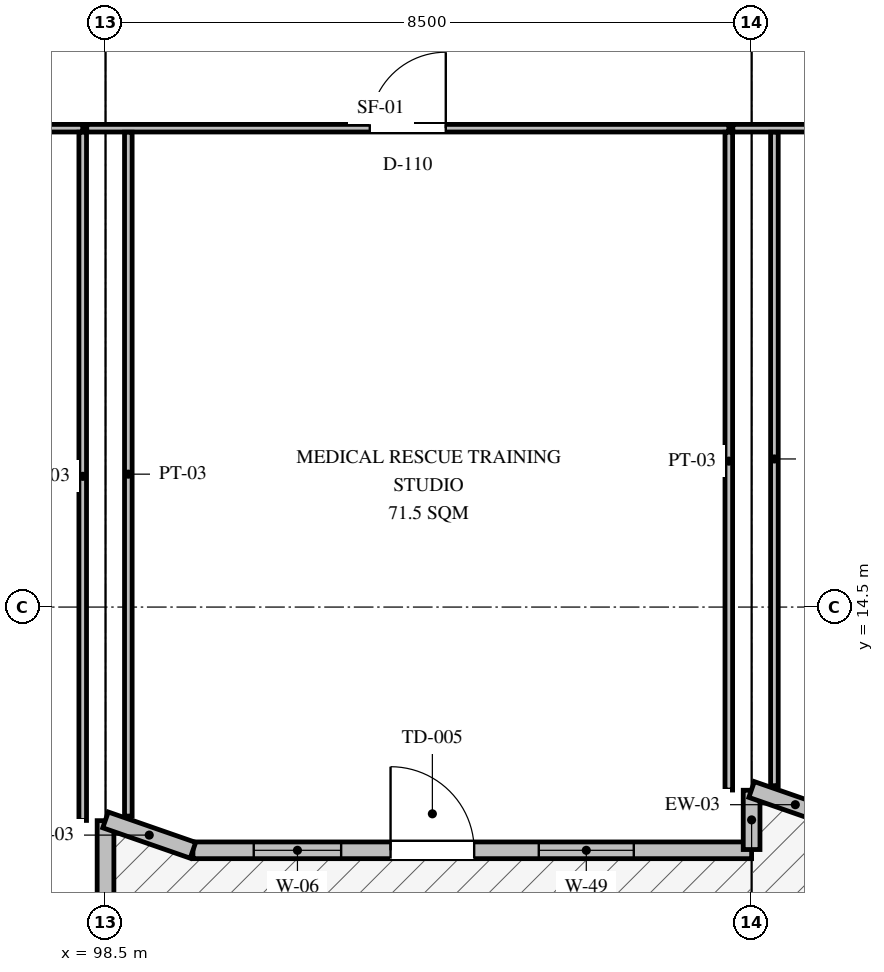
"""IFC4 building model, lengths in metres.
Left out: names, types, materials, properties, quantities, classifications, styles, units other than length and angle.
Written with IfcOpenShell. Run it as: python <this file> out.ifc"""

import sys

from ifc_helpers import new_model, si_unit, direction, frame, frame_2d, origin, place, context, subcontext, project, spatial, polyline, rectangle, outline, extrude, element, fill, save


model = new_model("IFC4")
c1 = context("Model", 3, precision=1e-05, world=origin(), true_north=direction((0.0, 1.0)))
c2 = subcontext(c1, "Body", "Model", "MODEL_VIEW")
j1 = project(units=[si_unit("LENGTHUNIT", "METRE"), si_unit("PLANEANGLEUNIT", "RADIAN")], contexts=[c1])
p1 = place(None, origin())
s1 = spatial("IfcSite", under=j1, at=p1, CompositionType="ELEMENT")
p2 = place(p1, origin())
s2 = spatial("IfcBuilding", under=s1, at=p2, CompositionType="ELEMENT")
p3 = place(p2, frame((0.0, 0.0, 5.85)))
s3 = spatial("IfcBuildingStorey", under=s2, at=p3, CompositionType="ELEMENT", Elevation=5.85)
p4 = place(p3, frame((98.5, 6.51, 0.0), z_axis=(0.0, 0.0, 1.0), x_axis=(0.0, 1.0, 0.0)))
e1 = element("IfcWall", 1, at=p4, inside=s3, PredefinedType="SOLIDWALL", context=c2, shape_type="SweptSolid", body=[
    extrude(rectangle(XDim=5.18, YDim=0.22, at=frame_2d((2.59, 0.0))), origin(), (0.0, 0.0, 1.0), 3.59),
])
p5 = place(p3, frame((99.65, 11.3, 0.0), z_axis=(0.0, 0.0, 1.0), x_axis=(1.0, 0.0, 0.0)))
e2 = element("IfcWall", 2, at=p5, inside=s3, PredefinedType="SOLIDWALL", context=c2, shape_type="SweptSolid", body=[
    extrude(rectangle(XDim=7.35, YDim=0.22, at=frame_2d((3.675, 0.0))), origin(), (0.0, 0.0, 1.0), 4.0),
])
p6 = place(p5, frame((2.6, 0.0, 0.0)))
e3 = element("IfcOpeningElement", 3, at=p6, cuts=e2, PredefinedType="OPENING", context=c2, shape_type="SweptSolid", body=[
    extrude(rectangle(XDim=1.1, YDim=2.2, at=frame_2d((0.55, 1.1))), frame((0.0, 0.12, 0.0), z_axis=(0.0, -1.0, 0.0), x_axis=(1.0, 0.0, 0.0)), (0.0, 0.0, 1.0), 0.24),
])
p7 = place(p5, frame((0.8, 0.0, 1.1)))
e4 = element("IfcOpeningElement", 4, at=p7, cuts=e2, PredefinedType="OPENING", context=c2, shape_type="SweptSolid", body=[
    extrude(rectangle(XDim=1.15, YDim=1.15, at=frame_2d((0.575, 0.575))), frame((0.0, 0.12, 0.0), z_axis=(0.0, -1.0, 0.0), x_axis=(1.0, 0.0, 0.0)), (0.0, 0.0, 1.0), 0.24),
])
p8 = place(p5, frame((4.55, 0.0, 1.35)))
e5 = element("IfcOpeningElement", 5, at=p8, cuts=e2, PredefinedType="OPENING", context=c2, shape_type="SweptSolid", body=[
    extrude(rectangle(XDim=1.25, YDim=1.65, at=frame_2d((0.625, 0.825))), frame((0.0, 0.12, 0.0), z_axis=(0.0, -1.0, 0.0), x_axis=(1.0, 0.0, 0.0)), (0.0, 0.0, 1.0), 0.24),
])
p9 = place(p3, frame((98.5, 11.7, 0.0), z_axis=(0.0, 0.0, 1.0), x_axis=(0.944513027611, -0.328473957373, 0.0)))
e6 = element("IfcWall", 6, at=p9, inside=s3, PredefinedType="SOLIDWALL", context=c2, shape_type="SweptSolid", body=[
    extrude(outline(polyline([(0.0, 0.0), (1.218, 0.0), (1.218, 3.95), (0.0, 3.95), (0.0, 0.0)])), frame((0.0, 0.11, 0.0), z_axis=(0.0, -1.0, 0.0), x_axis=(1.0, 0.0, 0.0)), (0.0, 0.0, 1.0), 0.22),
])
p10 = place(p3, frame((107.0, 11.31, 0.0), z_axis=(0.0, 0.0, 1.0), x_axis=(0.0, 1.0, 0.0)))
e7 = element("IfcWall", 7, at=p10, inside=s3, PredefinedType="SOLIDWALL", context=c2, shape_type="SweptSolid", body=[
    extrude(rectangle(XDim=0.78, YDim=0.22, at=frame_2d((0.39, 0.0))), origin(), (0.0, 0.0, 1.0), 3.59),
])
p11 = place(p3, frame((107.0, 12.1, 0.0), z_axis=(0.0, 0.0, 1.0), x_axis=(0.944450799651, -0.328652836651, 0.0)))
e8 = element("IfcWall", 8, at=p11, inside=s3, PredefinedType="SOLIDWALL", context=c2, shape_type="SweptSolid", body=[
    extrude(outline(polyline([(0.0, 0.0), (1.218, 0.0), (1.218, 3.95), (0.0, 3.95), (0.0, 0.0)])), frame((0.0, 0.11, 0.0), z_axis=(0.0, -1.0, 0.0), x_axis=(1.0, 0.0, 0.0)), (0.0, 0.0, 1.0), 0.22),
])
p12 = place(p3, frame((89.753, 20.8, 0.0), z_axis=(0.0, 0.0, 1.0), x_axis=(1.0, 0.0, 0.0)))
e9 = element("IfcWall", 9, at=p12, inside=s3, PredefinedType="PARTITIONING", context=c2, shape_type="SweptSolid", body=[
    extrude(rectangle(XDim=8.447, YDim=0.1, at=frame_2d((4.224, 0.0))), origin(), (0.0, 0.0, 1.0), 3.544),
])
p13 = place(p12, frame((3.723, 0.0, 0.0)))
e10 = element("IfcOpeningElement", 10, at=p13, cuts=e9, PredefinedType="OPENING", context=c2, shape_type="SweptSolid", body=[
    extrude(rectangle(XDim=1.0, YDim=2.1, at=frame_2d((0.5, 1.05))), frame((0.0, 0.06, 0.0), z_axis=(0.0, -1.0, 0.0), x_axis=(1.0, 0.0, 0.0)), (0.0, 0.0, 1.0), 0.12),
])
p14 = place(p3, frame((98.2, 11.693, 0.0), z_axis=(0.0, 0.0, 1.0), x_axis=(0.0, 1.0, 0.0)))
e11 = element("IfcWall", 11, at=p14, inside=s3, PredefinedType="PARTITIONING", context=c2, shape_type="SweptSolid", body=[
    extrude(rectangle(XDim=9.054, YDim=0.1, at=frame_2d((4.527, 0.0))), origin(), (0.0, 0.0, 1.0), 3.594),
])
p15 = place(p3, frame((98.253, 20.8, 0.0), z_axis=(0.0, 0.0, 1.0), x_axis=(1.0, 0.0, 0.0)))
e12 = element("IfcWall", 12, at=p15, inside=s3, PredefinedType="PARTITIONING", context=c2, shape_type="SweptSolid", body=[
    extrude(rectangle(XDim=8.447, YDim=0.1, at=frame_2d((4.224, 0.0))), origin(), (0.0, 0.0, 1.0), 3.544),
])
p16 = place(p15, frame((3.723, 0.0, 0.0)))
e13 = element("IfcOpeningElement", 13, at=p16, cuts=e12, PredefinedType="OPENING", context=c2, shape_type="SweptSolid", body=[
    extrude(rectangle(XDim=1.0, YDim=2.1, at=frame_2d((0.5, 1.05))), frame((0.0, 0.06, 0.0), z_axis=(0.0, -1.0, 0.0), x_axis=(1.0, 0.0, 0.0)), (0.0, 0.0, 1.0), 0.12),
])
p17 = place(p3, frame((98.8, 11.75, 0.0), z_axis=(0.0, 0.0, 1.0), x_axis=(0.0, 1.0, 0.0)))
e14 = element("IfcWall", 14, at=p17, inside=s3, PredefinedType="PARTITIONING", context=c2, shape_type="SweptSolid", body=[
    extrude(rectangle(XDim=8.997, YDim=0.1, at=frame_2d((4.499, 0.0))), origin(), (0.0, 0.0, 1.0), 3.594),
])
p18 = place(p3, frame((106.7, 12.093, 0.0), z_axis=(0.0, 0.0, 1.0), x_axis=(0.0, 1.0, 0.0)))
e15 = element("IfcWall", 15, at=p18, inside=s3, PredefinedType="PARTITIONING", context=c2, shape_type="SweptSolid", body=[
    extrude(rectangle(XDim=8.654, YDim=0.1, at=frame_2d((4.327, 0.0))), origin(), (0.0, 0.0, 1.0), 3.594),
])
p19 = place(p3, frame((106.753, 20.8, 0.0), z_axis=(0.0, 0.0, 1.0), x_axis=(1.0, 0.0, 0.0)))
e16 = element("IfcWall", 16, at=p19, inside=s3, PredefinedType="PARTITIONING", context=c2, shape_type="SweptSolid", body=[
    extrude(rectangle(XDim=8.447, YDim=0.1, at=frame_2d((4.224, 0.0))), origin(), (0.0, 0.0, 1.0), 3.544),
])
p20 = place(p19, frame((3.723, 0.0, 0.0)))
e17 = element("IfcOpeningElement", 17, at=p20, cuts=e16, PredefinedType="OPENING", context=c2, shape_type="SweptSolid", body=[
    extrude(rectangle(XDim=1.0, YDim=2.1, at=frame_2d((0.5, 1.05))), frame((0.0, 0.06, 0.0), z_axis=(0.0, -1.0, 0.0), x_axis=(1.0, 0.0, 0.0)), (0.0, 0.0, 1.0), 0.12),
])
p21 = place(p3, frame((107.3, 12.15, 0.0), z_axis=(0.0, 0.0, 1.0), x_axis=(0.0, 1.0, 0.0)))
e18 = element("IfcWall", 18, at=p21, inside=s3, PredefinedType="PARTITIONING", context=c2, shape_type="SweptSolid", body=[
    extrude(rectangle(XDim=8.597, YDim=0.1, at=frame_2d((4.299, 0.0))), origin(), (0.0, 0.0, 1.0), 3.594),
])
p22 = place(p6, frame((1.1, 0.0, 0.0), z_axis=(0.0, 0.0, 1.0), x_axis=(-1.0, 0.0, 0.0)))
e19 = element("IfcDoor", 19, at=p22, inside=s3, OperationType="SINGLE_SWING_LEFT", PredefinedType="DOOR", context=c2, shape_type="SweptSolid", body=[
    extrude(rectangle(XDim=1.1, YDim=2.2, at=frame_2d((0.55, 1.1))), frame((0.0, 0.025, 0.0), z_axis=(0.0, -1.0, 0.0), x_axis=(1.0, 0.0, 0.0)), (0.0, 0.0, 1.0), 0.05),
])
fill(e3, e19)
p23 = place(p7, origin())
e20 = element("IfcWindow", 20, at=p23, inside=s3, PartitioningType="SINGLE_PANEL", PredefinedType="WINDOW", context=c2, shape_type="SweptSolid", body=[
    extrude(rectangle(XDim=1.15, YDim=1.15, at=frame_2d((0.575, 0.575))), frame((0.0, 0.03, 0.0), z_axis=(0.0, -1.0, 0.0), x_axis=(1.0, 0.0, 0.0)), (0.0, 0.0, 1.0), 0.06),
])
fill(e4, e20)
p24 = place(p8, origin())
e21 = element("IfcWindow", 21, at=p24, inside=s3, PartitioningType="SINGLE_PANEL", PredefinedType="WINDOW", context=c2, shape_type="SweptSolid", body=[
    extrude(rectangle(XDim=1.25, YDim=1.65, at=frame_2d((0.625, 0.825))), frame((0.0, 0.03, 0.0), z_axis=(0.0, -1.0, 0.0), x_axis=(1.0, 0.0, 0.0)), (0.0, 0.0, 1.0), 0.06),
])
fill(e5, e21)
p25 = place(p16, origin())
e22 = element("IfcDoor", 22, at=p25, inside=s3, OperationType="SINGLE_SWING_RIGHT", PredefinedType="DOOR", context=c2, shape_type="SweptSolid", body=[
    extrude(rectangle(XDim=1.0, YDim=2.1, at=frame_2d((0.5, 1.05))), frame((0.0, 0.025, 0.0), z_axis=(0.0, -1.0, 0.0), x_axis=(1.0, 0.0, 0.0)), (0.0, 0.0, 1.0), 0.05),
])
fill(e13, e22)
save(model, sys.argv[1])
